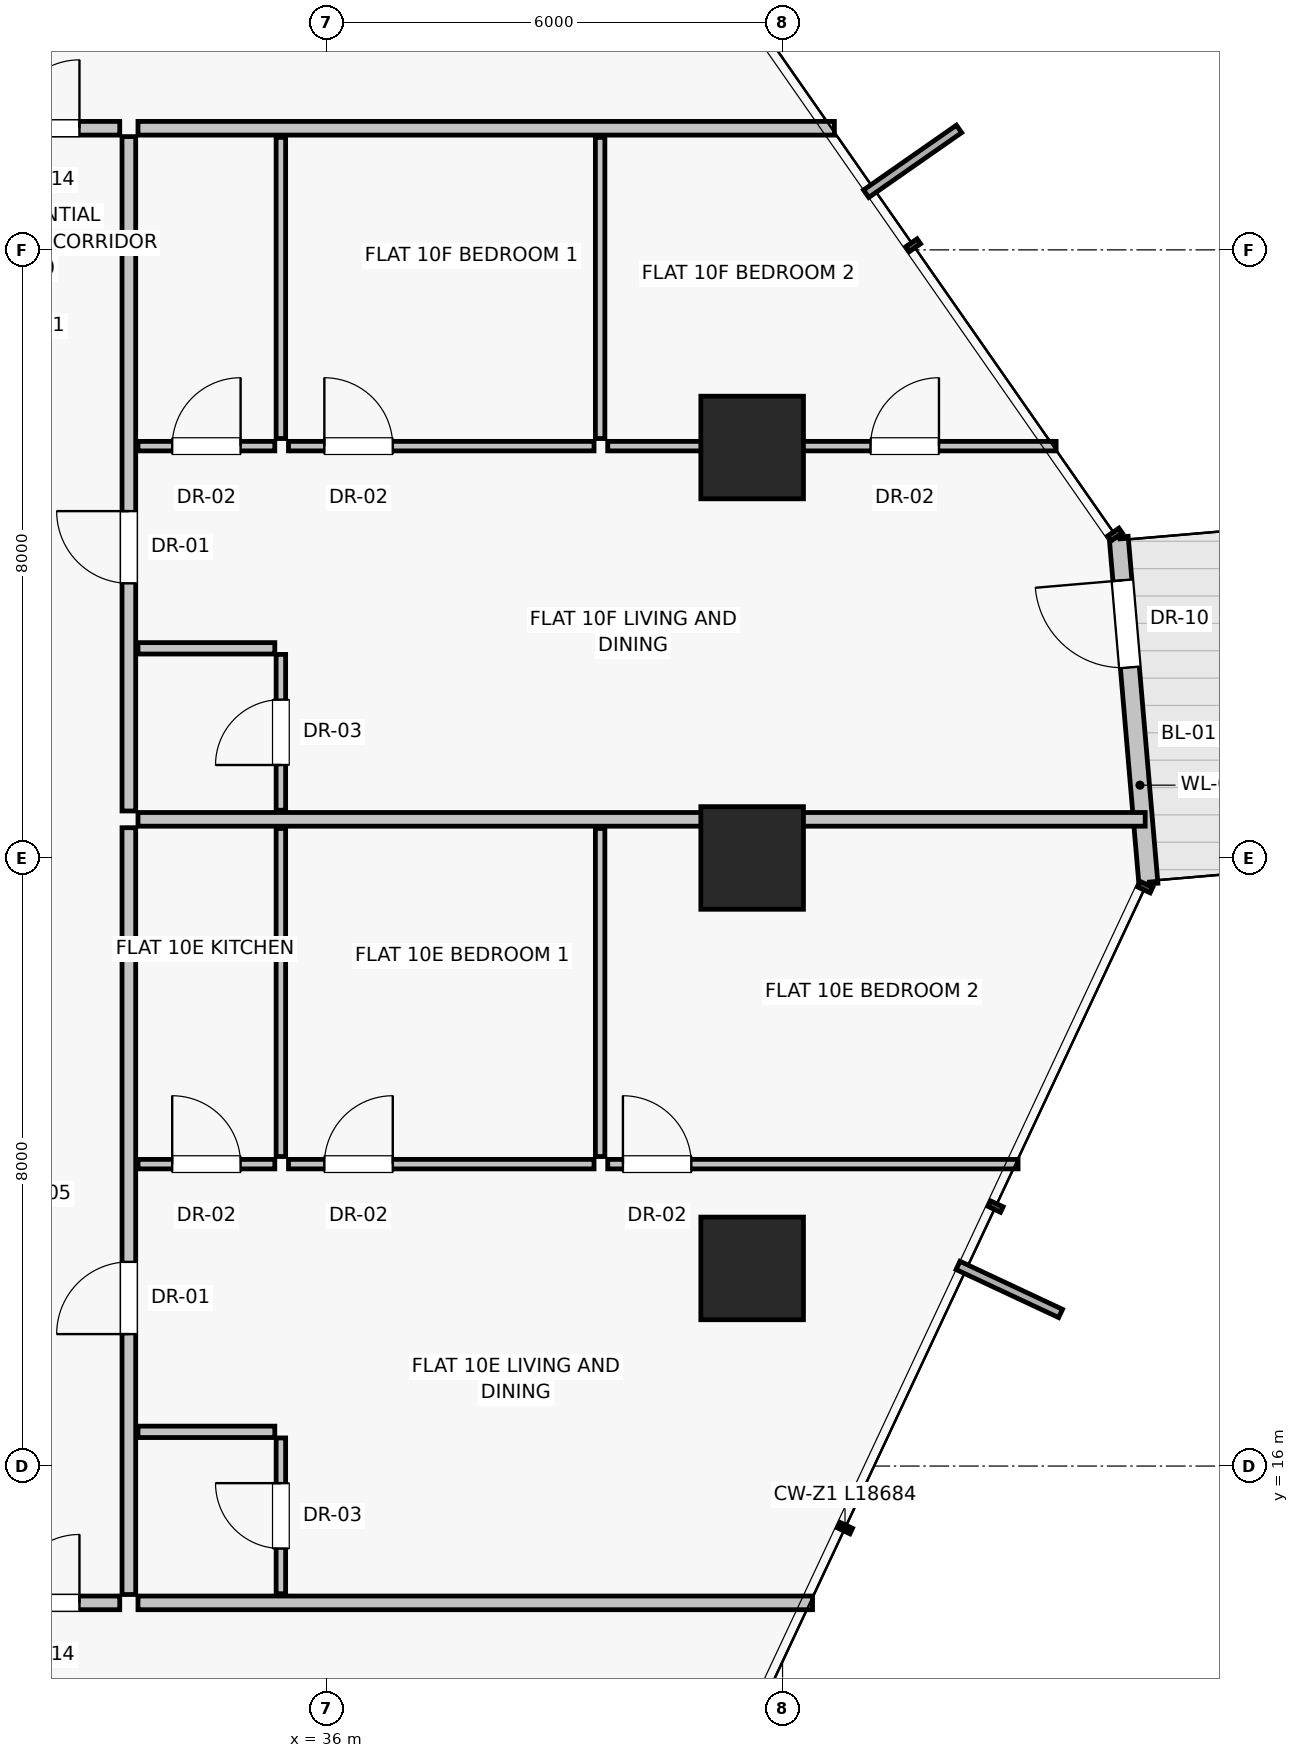
"""IFC4 building model, lengths in metres.
Left out: names, types, materials, properties, quantities, classifications, styles, units other than length and angle.
Written with IfcOpenShell. Run it as: python <this file> out.ifc"""

import sys

from ifc_helpers import new_model, si_unit, direction, frame, frame_2d, origin, origin_2d, place, context, subcontext, project, spatial, rectangle, extrude, source, transform, mapped, element, fill, save


model = new_model("IFC4")
c1 = context("Model", 3, precision=1e-05, world=origin(), true_north=direction((0.0, 1.0)))
c2 = subcontext(c1, "Body", "Model", "MODEL_VIEW")
j1 = project(units=[si_unit("LENGTHUNIT", "METRE"), si_unit("PLANEANGLEUNIT", "RADIAN")], contexts=[c1])
p1 = place(None, origin())
s1 = spatial("IfcSite", under=j1, at=p1, CompositionType="ELEMENT")
p2 = place(p1, origin())
s2 = spatial("IfcBuilding", under=s1, at=p2, CompositionType="ELEMENT")
p3 = place(p2, frame((0.0, 0.0, 40.3)))
s3 = spatial("IfcBuildingStorey", under=s2, at=p3, CompositionType="ELEMENT", Elevation=40.3)
for number, where, z_axis, x_axis in (
    (1, (41.6, 18.6, 0.0), (0.0, 0.0, 1.0), (1.0, 0.0, 0.0)),
    (2, (41.6, 24.0, 0.0), (0.0, 0.0, 1.0), (1.0, 0.0, 0.0)),
    (3, (41.6, 29.4, 0.0), (0.0, 0.0, 1.0), (1.0, 0.0, 0.0)),
):
    element("IfcColumn", number, at=place(p3, frame(where, z_axis=z_axis, x_axis=x_axis)), inside=s3, PredefinedType="COLUMN", context=c2, shape_type="SweptSolid", body=[
        extrude(rectangle(XDim=1.35, YDim=1.35, at=origin_2d()), origin(), (0.0, 0.0, 1.0), 3.25),
    ])
p4 = place(p3, frame((46.814, 23.657, 0.0), z_axis=(0.0, 0.0, 1.0), x_axis=(-0.085449522707, 0.996342500885, 0.0)))
e4 = element("IfcWall", 4, at=p4, inside=s3, PredefinedType="SOLIDWALL", context=c2, shape_type="SweptSolid", body=[
    extrude(rectangle(XDim=4.58, YDim=0.25, at=frame_2d((2.29, 0.0))), origin(), (0.0, 0.0, 1.0), 3.0),
])
p5 = place(p4, frame((2.86, 0.0, 0.0)))
e5 = element("IfcOpeningElement", 5, at=p5, cuts=e4, PredefinedType="OPENING", context=c2, shape_type="SweptSolid", body=[
    extrude(rectangle(XDim=1.15, YDim=2.25, at=frame_2d((0.575, 1.125))), frame((0.0, 0.135, 0.0), z_axis=(0.0, -1.0, 0.0), x_axis=(1.0, 0.0, 0.0)), (0.0, 0.0, 1.0), 0.27),
])
p6 = place(p3, frame((33.52, 14.2, 0.0), z_axis=(0.0, 0.0, 1.0), x_axis=(1.0, 0.0, 0.0)))
e6 = element("IfcWall", 6, at=p6, inside=s3, PredefinedType="PARTITIONING", context=c2, shape_type="SweptSolid", body=[
    extrude(rectangle(XDim=8.875, YDim=0.18, at=frame_2d((4.437, 0.0))), origin(), (0.0, 0.0, 1.0), 3.0),
])
p7 = place(p3, frame((33.52, 33.6, 0.0), z_axis=(0.0, 0.0, 1.0), x_axis=(1.0, 0.0, 0.0)))
e7 = element("IfcWall", 7, at=p7, inside=s3, PredefinedType="PARTITIONING", context=c2, shape_type="SweptSolid", body=[
    extrude(rectangle(XDim=9.162, YDim=0.18, at=frame_2d((4.581, 0.0))), origin(), (0.0, 0.0, 1.0), 3.0),
])
p8 = place(p3, frame((33.4, 14.31, 0.0), z_axis=(0.0, 0.0, 1.0), x_axis=(0.0, 1.0, 0.0)))
e8 = element("IfcWall", 8, at=p8, inside=s3, PredefinedType="PARTITIONING", context=c2, shape_type="SweptSolid", body=[
    extrude(rectangle(XDim=10.088, YDim=0.18, at=frame_2d((5.044, 0.0))), origin(), (0.0, 0.0, 1.0), 3.0),
])
p9 = place(p8, frame((3.426, 0.0, 0.0)))
e9 = element("IfcOpeningElement", 9, at=p9, cuts=e8, PredefinedType="OPENING", context=c2, shape_type="SweptSolid", body=[
    extrude(rectangle(XDim=0.95, YDim=2.02, at=frame_2d((0.475, 1.01))), frame((0.0, 0.1, 0.0), z_axis=(0.0, -1.0, 0.0), x_axis=(1.0, 0.0, 0.0)), (0.0, 0.0, 1.0), 0.2),
])
p10 = place(p3, frame((33.52, 16.45, 0.0), z_axis=(0.0, 0.0, 1.0), x_axis=(1.0, 0.0, 0.0)))
e10 = element("IfcWall", 10, at=p10, inside=s3, PredefinedType="PARTITIONING", context=c2, shape_type="SweptSolid", body=[
    extrude(rectangle(XDim=1.8, YDim=0.15, at=frame_2d((0.9, 0.0))), origin(), (0.0, 0.0, 1.0), 3.0),
])
p11 = place(p3, frame((35.4, 14.32, 0.0), z_axis=(0.0, 0.0, 1.0), x_axis=(0.0, 1.0, 0.0)))
e11 = element("IfcWall", 11, at=p11, inside=s3, PredefinedType="PARTITIONING", context=c2, shape_type="SweptSolid", body=[
    extrude(rectangle(XDim=2.05, YDim=0.125, at=frame_2d((1.025, 0.0))), origin(), (0.0, 0.0, 1.0), 3.0),
])
p12 = place(p11, frame((0.595, 0.0, 0.0)))
e12 = element("IfcOpeningElement", 12, at=p12, cuts=e11, PredefinedType="OPENING", context=c2, shape_type="SweptSolid", body=[
    extrude(rectangle(XDim=0.86, YDim=2.01, at=frame_2d((0.43, 1.005))), frame((0.0, 0.073, 0.0), z_axis=(0.0, -1.0, 0.0), x_axis=(1.0, 0.0, 0.0)), (0.0, 0.0, 1.0), 0.145),
])
p13 = place(p3, frame((33.52, 19.972, 0.0), z_axis=(0.0, 0.0, 1.0), x_axis=(1.0, 0.0, 0.0)))
e13 = element("IfcWall", 13, at=p13, inside=s3, PredefinedType="PARTITIONING", context=c2, shape_type="SweptSolid", body=[
    extrude(rectangle(XDim=1.8, YDim=0.125, at=frame_2d((0.9, 0.0))), origin(), (0.0, 0.0, 1.0), 3.0),
])
p14 = place(p13, frame((0.45, 0.0, 0.0)))
e14 = element("IfcOpeningElement", 14, at=p14, cuts=e13, PredefinedType="OPENING", context=c2, shape_type="SweptSolid", body=[
    extrude(rectangle(XDim=0.9, YDim=2.01, at=frame_2d((0.45, 1.005))), frame((0.0, 0.073, 0.0), z_axis=(0.0, -1.0, 0.0), x_axis=(1.0, 0.0, 0.0)), (0.0, 0.0, 1.0), 0.145),
])
for number, where, z_axis, x_axis in (
    (15, (35.4, 20.072, 0.0), (0.0, 0.0, 1.0), (0.0, 1.0, 0.0)),
    (16, (39.6, 20.072, 0.0), (0.0, 0.0, 1.0), (0.0, 1.0, 0.0)),
):
    element("IfcWall", number, at=place(p3, frame(where, z_axis=z_axis, x_axis=x_axis)), inside=s3, PredefinedType="PARTITIONING", context=c2, shape_type="SweptSolid", body=[
        extrude(rectangle(XDim=4.316, YDim=0.125, at=frame_2d((2.158, 0.0))), origin(), (0.0, 0.0, 1.0), 3.0),
    ])
p15 = place(p3, frame((35.5, 19.972, 0.0), z_axis=(0.0, 0.0, 1.0), x_axis=(1.0, 0.0, 0.0)))
e17 = element("IfcWall", 17, at=p15, inside=s3, PredefinedType="PARTITIONING", context=c2, shape_type="SweptSolid", body=[
    extrude(rectangle(XDim=4.02, YDim=0.125, at=frame_2d((2.01, 0.0))), origin(), (0.0, 0.0, 1.0), 3.0),
])
p16 = place(p15, frame((0.472, 0.0, 0.0)))
e18 = element("IfcOpeningElement", 18, at=p16, cuts=e17, PredefinedType="OPENING", context=c2, shape_type="SweptSolid", body=[
    extrude(rectangle(XDim=0.9, YDim=2.01, at=frame_2d((0.45, 1.005))), frame((0.0, 0.073, 0.0), z_axis=(0.0, -1.0, 0.0), x_axis=(1.0, 0.0, 0.0)), (0.0, 0.0, 1.0), 0.145),
])
p17 = place(p3, frame((39.7, 19.972, 0.0), z_axis=(0.0, 0.0, 1.0), x_axis=(1.0, 0.0, 0.0)))
e19 = element("IfcWall", 19, at=p17, inside=s3, PredefinedType="PARTITIONING", context=c2, shape_type="SweptSolid", body=[
    extrude(rectangle(XDim=5.398, YDim=0.125, at=frame_2d((2.699, 0.0))), origin(), (0.0, 0.0, 1.0), 3.0),
])
p18 = place(p17, frame((0.2, 0.0, 0.0)))
e20 = element("IfcOpeningElement", 20, at=p18, cuts=e19, PredefinedType="OPENING", context=c2, shape_type="SweptSolid", body=[
    extrude(rectangle(XDim=0.9, YDim=2.01, at=frame_2d((0.45, 1.005))), frame((0.0, 0.073, 0.0), z_axis=(0.0, -1.0, 0.0), x_axis=(1.0, 0.0, 0.0)), (0.0, 0.0, 1.0), 0.145),
])
p19 = place(p3, frame((33.52, 24.508, 0.0), z_axis=(0.0, 0.0, 1.0), x_axis=(1.0, 0.0, 0.0)))
e21 = element("IfcWall", 21, at=p19, inside=s3, PredefinedType="PARTITIONING", context=c2, shape_type="SweptSolid", body=[
    extrude(rectangle(XDim=13.251, YDim=0.18, at=frame_2d((6.625, 0.0))), origin(), (0.0, 0.0, 1.0), 3.0),
])
p20 = place(p3, frame((33.4, 24.618, 0.0), z_axis=(0.0, 0.0, 1.0), x_axis=(0.0, 1.0, 0.0)))
e22 = element("IfcWall", 22, at=p20, inside=s3, PredefinedType="PARTITIONING", context=c2, shape_type="SweptSolid", body=[
    extrude(rectangle(XDim=8.872, YDim=0.18, at=frame_2d((4.436, 0.0))), origin(), (0.0, 0.0, 1.0), 3.0),
])
p21 = place(p20, frame((2.995, 0.0, 0.0)))
e23 = element("IfcOpeningElement", 23, at=p21, cuts=e22, PredefinedType="OPENING", context=c2, shape_type="SweptSolid", body=[
    extrude(rectangle(XDim=0.95, YDim=2.02, at=frame_2d((0.475, 1.01))), frame((0.0, 0.1, 0.0), z_axis=(0.0, -1.0, 0.0), x_axis=(1.0, 0.0, 0.0)), (0.0, 0.0, 1.0), 0.2),
])
p22 = place(p3, frame((33.52, 26.758, 0.0), z_axis=(0.0, 0.0, 1.0), x_axis=(1.0, 0.0, 0.0)))
e24 = element("IfcWall", 24, at=p22, inside=s3, PredefinedType="PARTITIONING", context=c2, shape_type="SweptSolid", body=[
    extrude(rectangle(XDim=1.8, YDim=0.15, at=frame_2d((0.9, 0.0))), origin(), (0.0, 0.0, 1.0), 3.0),
])
p23 = place(p3, frame((35.4, 24.628, 0.0), z_axis=(0.0, 0.0, 1.0), x_axis=(0.0, 1.0, 0.0)))
e25 = element("IfcWall", 25, at=p23, inside=s3, PredefinedType="PARTITIONING", context=c2, shape_type="SweptSolid", body=[
    extrude(rectangle(XDim=2.05, YDim=0.125, at=frame_2d((1.025, 0.0))), origin(), (0.0, 0.0, 1.0), 3.0),
])
p24 = place(p23, frame((0.595, 0.0, 0.0)))
e26 = element("IfcOpeningElement", 26, at=p24, cuts=e25, PredefinedType="OPENING", context=c2, shape_type="SweptSolid", body=[
    extrude(rectangle(XDim=0.86, YDim=2.01, at=frame_2d((0.43, 1.005))), frame((0.0, 0.073, 0.0), z_axis=(0.0, -1.0, 0.0), x_axis=(1.0, 0.0, 0.0)), (0.0, 0.0, 1.0), 0.145),
])
p25 = place(p3, frame((33.52, 29.418, 0.0), z_axis=(0.0, 0.0, 1.0), x_axis=(1.0, 0.0, 0.0)))
e27 = element("IfcWall", 27, at=p25, inside=s3, PredefinedType="PARTITIONING", context=c2, shape_type="SweptSolid", body=[
    extrude(rectangle(XDim=1.8, YDim=0.125, at=frame_2d((0.9, 0.0))), origin(), (0.0, 0.0, 1.0), 3.0),
])
p26 = place(p25, frame((0.45, 0.0, 0.0)))
e28 = element("IfcOpeningElement", 28, at=p26, cuts=e27, PredefinedType="OPENING", context=c2, shape_type="SweptSolid", body=[
    extrude(rectangle(XDim=0.9, YDim=2.01, at=frame_2d((0.45, 1.005))), frame((0.0, 0.073, 0.0), z_axis=(0.0, -1.0, 0.0), x_axis=(1.0, 0.0, 0.0)), (0.0, 0.0, 1.0), 0.145),
])
for number, where, z_axis, x_axis in (
    (29, (35.4, 29.518, 0.0), (0.0, 0.0, 1.0), (0.0, 1.0, 0.0)),
    (30, (39.6, 29.518, 0.0), (0.0, 0.0, 1.0), (0.0, 1.0, 0.0)),
):
    element("IfcWall", number, at=place(p3, frame(where, z_axis=z_axis, x_axis=x_axis)), inside=s3, PredefinedType="PARTITIONING", context=c2, shape_type="SweptSolid", body=[
        extrude(rectangle(XDim=3.962, YDim=0.125, at=frame_2d((1.981, 0.0))), origin(), (0.0, 0.0, 1.0), 3.0),
    ])
p27 = place(p3, frame((35.5, 29.418, 0.0), z_axis=(0.0, 0.0, 1.0), x_axis=(1.0, 0.0, 0.0)))
e31 = element("IfcWall", 31, at=p27, inside=s3, PredefinedType="PARTITIONING", context=c2, shape_type="SweptSolid", body=[
    extrude(rectangle(XDim=4.02, YDim=0.125, at=frame_2d((2.01, 0.0))), origin(), (0.0, 0.0, 1.0), 2.299),
])
p28 = place(p27, frame((0.472, 0.0, 0.0)))
e32 = element("IfcOpeningElement", 32, at=p28, cuts=e31, PredefinedType="OPENING", context=c2, shape_type="SweptSolid", body=[
    extrude(rectangle(XDim=0.9, YDim=2.01, at=frame_2d((0.45, 1.005))), frame((0.0, 0.073, 0.0), z_axis=(0.0, -1.0, 0.0), x_axis=(1.0, 0.0, 0.0)), (0.0, 0.0, 1.0), 0.145),
])
p29 = place(p3, frame((39.7, 29.418, 0.0), z_axis=(0.0, 0.0, 1.0), x_axis=(1.0, 0.0, 0.0)))
e33 = element("IfcWall", 33, at=p29, inside=s3, PredefinedType="PARTITIONING", context=c2, shape_type="SweptSolid", body=[
    extrude(rectangle(XDim=5.899, YDim=0.125, at=frame_2d((2.95, 0.0))), origin(), (0.0, 0.0, 1.0), 2.299),
])
p30 = place(p29, frame((3.458, 0.0, 0.0)))
e34 = element("IfcOpeningElement", 34, at=p30, cuts=e33, PredefinedType="OPENING", context=c2, shape_type="SweptSolid", body=[
    extrude(rectangle(XDim=0.9, YDim=2.01, at=frame_2d((0.45, 1.005))), frame((0.0, 0.073, 0.0), z_axis=(0.0, -1.0, 0.0), x_axis=(1.0, 0.0, 0.0)), (0.0, 0.0, 1.0), 0.145),
])
p31 = place(p3, frame((31.32, 14.2, 0.0), z_axis=(0.0, 0.0, 1.0), x_axis=(1.0, 0.0, 0.0)))
e35 = element("IfcWall", 35, at=p31, inside=s3, PredefinedType="PARTITIONING", context=c2, shape_type="SweptSolid", body=[
    extrude(rectangle(XDim=1.96, YDim=0.18, at=frame_2d((0.98, 0.0))), origin(), (0.0, 0.0, 1.0), 3.0),
])
p32 = place(p31, frame((0.53, 0.0, 0.0)))
e36 = element("IfcOpeningElement", 36, at=p32, cuts=e35, PredefinedType="OPENING", context=c2, shape_type="SweptSolid", body=[
    extrude(rectangle(XDim=0.9, YDim=2.01, at=frame_2d((0.45, 1.005))), frame((0.0, 0.1, 0.0), z_axis=(0.0, -1.0, 0.0), x_axis=(1.0, 0.0, 0.0)), (0.0, 0.0, 1.0), 0.2),
])
p33 = place(p3, frame((31.32, 33.6, 0.0), z_axis=(0.0, 0.0, 1.0), x_axis=(1.0, 0.0, 0.0)))
e37 = element("IfcWall", 37, at=p33, inside=s3, PredefinedType="PARTITIONING", context=c2, shape_type="SweptSolid", body=[
    extrude(rectangle(XDim=1.96, YDim=0.18, at=frame_2d((0.98, 0.0))), origin(), (0.0, 0.0, 1.0), 3.0),
])
p34 = place(p33, frame((0.53, 0.0, 0.0)))
e38 = element("IfcOpeningElement", 38, at=p34, cuts=e37, PredefinedType="OPENING", context=c2, shape_type="SweptSolid", body=[
    extrude(rectangle(XDim=0.9, YDim=2.01, at=frame_2d((0.45, 1.005))), frame((0.0, 0.1, 0.0), z_axis=(0.0, -1.0, 0.0), x_axis=(1.0, 0.0, 0.0)), (0.0, 0.0, 1.0), 0.2),
])
m1 = source(origin(), c2, "Body", "SweptSolid", [
    extrude(rectangle(XDim=1.15, YDim=2.25, at=frame_2d((0.575, 1.125))), frame((0.0, 0.025, 0.0), z_axis=(0.0, -1.0, 0.0), x_axis=(1.0, 0.0, 0.0)), (0.0, 0.0, 1.0), 0.05),
])
p35 = place(p5, frame((1.15, 0.0, 0.0), z_axis=(0.0, 0.0, 1.0), x_axis=(-1.0, 0.0, 0.0)))
e39 = element("IfcDoor", 39, at=p35, inside=s3, OperationType="SINGLE_SWING_RIGHT", PredefinedType="DOOR", context=c2, shape_type="MappedRepresentation", body=[
    mapped(m1, transform((0.0, 0.0, 0.0), scale=1.0)),
])
fill(e5, e39)
m2 = source(origin(), c2, "Body", "SweptSolid", [
    extrude(rectangle(XDim=0.95, YDim=2.02, at=frame_2d((0.475, 1.01))), frame((0.0, 0.025, 0.0), z_axis=(0.0, -1.0, 0.0), x_axis=(1.0, 0.0, 0.0)), (0.0, 0.0, 1.0), 0.05),
])
p36 = place(p9, origin())
e40 = element("IfcDoor", 40, at=p36, inside=s3, OperationType="SINGLE_SWING_LEFT", PredefinedType="DOOR", context=c2, shape_type="MappedRepresentation", body=[
    mapped(m2, transform((0.0, 0.0, 0.0), scale=1.0)),
])
fill(e9, e40)
m3 = source(origin(), c2, "Body", "SweptSolid", [
    extrude(rectangle(XDim=0.86, YDim=2.01, at=frame_2d((0.43, 1.005))), frame((0.0, 0.025, 0.0), z_axis=(0.0, -1.0, 0.0), x_axis=(1.0, 0.0, 0.0)), (0.0, 0.0, 1.0), 0.05),
])
p37 = place(p12, origin())
e41 = element("IfcDoor", 41, at=p37, inside=s3, OperationType="SINGLE_SWING_RIGHT", PredefinedType="DOOR", context=c2, shape_type="MappedRepresentation", body=[
    mapped(m3, transform((0.0, 0.0, 0.0), scale=1.0)),
])
fill(e12, e41)
m4 = source(origin(), c2, "Body", "SweptSolid", [
    extrude(rectangle(XDim=0.9, YDim=2.01, at=frame_2d((0.45, 1.005))), frame((0.0, 0.025, 0.0), z_axis=(0.0, -1.0, 0.0), x_axis=(1.0, 0.0, 0.0)), (0.0, 0.0, 1.0), 0.05),
])
p38 = place(p14, origin())
e42 = element("IfcDoor", 42, at=p38, inside=s3, OperationType="SINGLE_SWING_LEFT", PredefinedType="DOOR", context=c2, shape_type="MappedRepresentation", body=[
    mapped(m4, transform((0.0, 0.0, 0.0), scale=1.0)),
])
fill(e14, e42)
p39 = place(p16, origin())
e43 = element("IfcDoor", 43, at=p39, inside=s3, OperationType="SINGLE_SWING_RIGHT", PredefinedType="DOOR", context=c2, shape_type="MappedRepresentation", body=[
    mapped(m4, transform((0.0, 0.0, 0.0), scale=1.0)),
])
fill(e18, e43)
p40 = place(p18, origin())
e44 = element("IfcDoor", 44, at=p40, inside=s3, OperationType="SINGLE_SWING_LEFT", PredefinedType="DOOR", context=c2, shape_type="MappedRepresentation", body=[
    mapped(m4, transform((0.0, 0.0, 0.0), scale=1.0)),
])
fill(e20, e44)
p41 = place(p21, origin())
e45 = element("IfcDoor", 45, at=p41, inside=s3, OperationType="SINGLE_SWING_RIGHT", PredefinedType="DOOR", context=c2, shape_type="MappedRepresentation", body=[
    mapped(m2, transform((0.0, 0.0, 0.0), scale=1.0)),
])
fill(e23, e45)
p42 = place(p24, origin())
e46 = element("IfcDoor", 46, at=p42, inside=s3, OperationType="SINGLE_SWING_LEFT", PredefinedType="DOOR", context=c2, shape_type="MappedRepresentation", body=[
    mapped(m3, transform((0.0, 0.0, 0.0), scale=1.0)),
])
fill(e26, e46)
p43 = place(p26, origin())
e47 = element("IfcDoor", 47, at=p43, inside=s3, OperationType="SINGLE_SWING_RIGHT", PredefinedType="DOOR", context=c2, shape_type="MappedRepresentation", body=[
    mapped(m4, transform((0.0, 0.0, 0.0), scale=1.0)),
])
fill(e28, e47)
p44 = place(p28, origin())
e48 = element("IfcDoor", 48, at=p44, inside=s3, OperationType="SINGLE_SWING_LEFT", PredefinedType="DOOR", context=c2, shape_type="MappedRepresentation", body=[
    mapped(m4, transform((0.0, 0.0, 0.0), scale=1.0)),
])
fill(e32, e48)
p45 = place(p30, origin())
e49 = element("IfcDoor", 49, at=p45, inside=s3, OperationType="SINGLE_SWING_RIGHT", PredefinedType="DOOR", context=c2, shape_type="MappedRepresentation", body=[
    mapped(m4, transform((0.0, 0.0, 0.0), scale=1.0)),
])
fill(e34, e49)
p46 = place(p32, origin())
e50 = element("IfcDoor", 50, at=p46, inside=s3, OperationType="SINGLE_SWING_RIGHT", PredefinedType="DOOR", context=c2, shape_type="MappedRepresentation", body=[
    mapped(m4, transform((0.0, 0.0, 0.0), scale=1.0)),
])
fill(e36, e50)
p47 = place(p34, origin())
e51 = element("IfcDoor", 51, at=p47, inside=s3, OperationType="SINGLE_SWING_RIGHT", PredefinedType="DOOR", context=c2, shape_type="MappedRepresentation", body=[
    mapped(m4, transform((0.0, 0.0, 0.0), scale=1.0)),
])
fill(e38, e51)
save(model, sys.argv[1])
